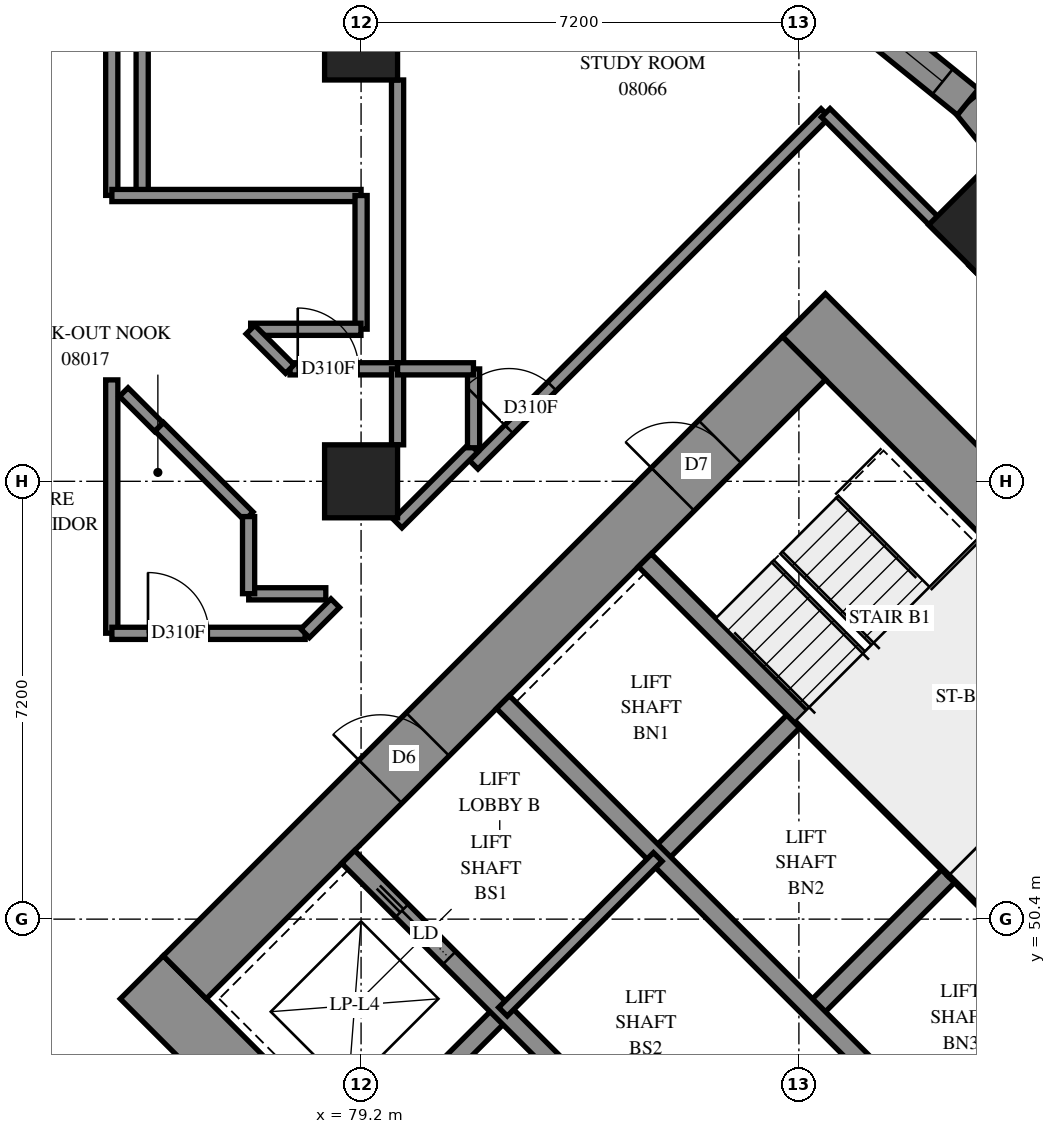
"""IFC4 building model, lengths in metres.
Left out: names, types, materials, properties, quantities, classifications, styles, units other than length and angle.
Written with IfcOpenShell. Run it as: python <this file> out.ifc"""

import sys

from ifc_helpers import new_model, si_unit, direction, frame, frame_2d, origin, origin_2d, place, context, subcontext, project, spatial, polyline, rectangle, outline, extrude, element, fill, save


model = new_model("IFC4")
c1 = context("Model", 3, precision=1e-05, world=origin(), true_north=direction((0.0, 1.0)))
c2 = subcontext(c1, "Body", "Model", "MODEL_VIEW")
j1 = project(units=[si_unit("LENGTHUNIT", "METRE"), si_unit("PLANEANGLEUNIT", "RADIAN")], contexts=[c1])
p1 = place(None, origin())
s1 = spatial("IfcSite", under=j1, at=p1, CompositionType="ELEMENT")
p2 = place(p1, origin())
s2 = spatial("IfcBuilding", under=s1, at=p2, CompositionType="ELEMENT")
p3 = place(p2, frame((0.0, 0.0, 33.8)))
s3 = spatial("IfcBuildingStorey", under=s2, at=p3, CompositionType="ELEMENT", Elevation=33.8)
for number, where, z_axis, x_axis in (
    (1, (79.2, 57.6, 0.0), (0.0, 0.0, 1.0), (1.0, 0.0, 0.0)),
    (2, (79.2, 64.8, 0.0), (0.0, 0.0, 1.0), (1.0, 0.0, 0.0)),
    (3, (89.382, 61.818, 0.0), (0.0, 0.0, 1.0), (0.707, -0.707, 0.0)),
):
    element("IfcColumn", number, at=place(p3, frame(where, z_axis=z_axis, x_axis=x_axis)), inside=s3, PredefinedType="COLUMN", context=c2, shape_type="SweptSolid", body=[
        extrude(rectangle(XDim=1.2, YDim=1.2, at=origin_2d()), origin(), (0.0, 0.0, 1.0), 3.1),
    ])
p4 = place(p3, frame((75.594, 49.443, -0.3), z_axis=(0.0, 0.0, 1.0), x_axis=(0.7071037324, -0.70710983, 0.0)))
e4 = element("IfcWall", 4, at=p4, inside=s3, PredefinedType="SHEAR", context=c2, shape_type="SweptSolid", body=[
    extrude(rectangle(XDim=16.4, YDim=1.0, at=frame_2d((8.2, 0.0))), origin(), (0.0, 0.0, 1.0), 2.7),
])
p5 = place(p3, frame((86.483, 60.333, -0.3), z_axis=(0.0, 0.0, 1.0), x_axis=(0.70710983, -0.7071037324, 0.0)))
e5 = element("IfcWall", 5, at=p5, inside=s3, PredefinedType="SHEAR", context=c2, shape_type="SweptSolid", body=[
    extrude(rectangle(XDim=16.4, YDim=1.0, at=frame_2d((8.2, 0.0))), origin(), (0.0, 0.0, 1.0), 2.7),
])
p6 = place(p5, frame((11.0, 0.0, 0.3)))
e6 = element("IfcOpeningElement", 6, at=p6, cuts=e5, PredefinedType="OPENING", context=c2, shape_type="SweptSolid", body=[
    extrude(rectangle(XDim=0.8, YDim=2.1, at=frame_2d((0.4, 1.05))), frame((0.0, 0.51, 0.0), z_axis=(0.0, -1.0, 0.0), x_axis=(1.0, 0.0, 0.0)), (0.0, 0.0, 1.0), 1.02),
])
p7 = place(p3, frame((76.301, 49.443, -0.3), z_axis=(0.0, 0.0, 1.0), x_axis=(0.7071067812, 0.7071067812, 0.0)))
e7 = element("IfcWall", 7, at=p7, inside=s3, PredefinedType="SHEAR", context=c2, shape_type="SweptSolid", body=[
    extrude(rectangle(XDim=14.4, YDim=1.0, at=frame_2d((7.2, 0.0))), origin(), (0.0, 0.0, 1.0), 2.7),
])
p8 = place(p7, frame((4.55, 0.0, 0.3)))
e8 = element("IfcOpeningElement", 8, at=p8, cuts=e7, PredefinedType="OPENING", context=c2, shape_type="SweptSolid", body=[
    extrude(rectangle(XDim=1.1, YDim=2.1, at=frame_2d((0.55, 1.05))), frame((0.0, 0.51, 0.0), z_axis=(0.0, -1.0, 0.0), x_axis=(1.0, 0.0, 0.0)), (0.0, 0.0, 1.0), 1.02),
])
p9 = place(p7, frame((11.35, 0.0, 0.3)))
e9 = element("IfcOpeningElement", 9, at=p9, cuts=e7, PredefinedType="OPENING", context=c2, shape_type="SweptSolid", body=[
    extrude(rectangle(XDim=1.1, YDim=2.1, at=frame_2d((0.55, 1.05))), frame((0.0, 0.51, 0.0), z_axis=(0.0, -1.0, 0.0), x_axis=(1.0, 0.0, 0.0)), (0.0, 0.0, 1.0), 1.02),
])
p10 = place(p3, frame((87.19, 38.554, -0.3), z_axis=(0.0, 0.0, 1.0), x_axis=(0.707103309, 0.7071102534, 0.0)))
e10 = element("IfcWall", 10, at=p10, inside=s3, PredefinedType="SHEAR", context=c2, shape_type="SweptSolid", body=[
    extrude(rectangle(XDim=14.4, YDim=1.0, at=frame_2d((7.2, 0.0))), origin(), (0.0, 0.0, 1.0), 2.7),
])
p11 = place(p10, frame((4.55, 0.0, 0.3)))
e11 = element("IfcOpeningElement", 11, at=p11, cuts=e10, PredefinedType="OPENING", context=c2, shape_type="SweptSolid", body=[
    extrude(rectangle(XDim=1.1, YDim=2.1, at=frame_2d((0.55, 1.05))), frame((0.0, 0.51, 0.0), z_axis=(0.0, -1.0, 0.0), x_axis=(1.0, 0.0, 0.0)), (0.0, 0.0, 1.0), 1.02),
])
p12 = place(p10, frame((11.35, 0.0, 0.3)))
e12 = element("IfcOpeningElement", 12, at=p12, cuts=e10, PredefinedType="OPENING", context=c2, shape_type="SweptSolid", body=[
    extrude(rectangle(XDim=1.1, YDim=2.1, at=frame_2d((0.55, 1.05))), frame((0.0, 0.51, 0.0), z_axis=(0.0, -1.0, 0.0), x_axis=(1.0, 0.0, 0.0)), (0.0, 0.0, 1.0), 1.02),
])
for number, where, z_axis, x_axis in (
    (13, (79.2, 46.544, 0.0), (0.0, 0.0, 1.0), (0.707, 0.707, 0.0)),
    (14, (84.079, 51.423, 0.0), (0.0, 0.0, 1.0), (0.707, 0.707, 0.0)),
):
    element("IfcWall", number, at=place(p3, frame(where, z_axis=z_axis, x_axis=x_axis)), inside=s3, PredefinedType="SOLIDWALL", context=c2, shape_type="SweptSolid", body=[
        extrude(rectangle(XDim=3.3, YDim=0.3, at=frame_2d((1.65, 0.0))), origin(), (0.0, 0.0, 1.0), 3.1),
    ])
for number, where, z_axis, x_axis in (
    (15, (86.625, 48.878, 0.0), (0.0, 0.0, 1.0), (0.707, 0.707, 0.0)),
    (16, (89.17, 46.332, 0.0), (0.0, 0.0, 1.0), (0.707, 0.707, 0.0)),
):
    element("IfcWall", number, at=place(p3, frame(where, z_axis=z_axis, x_axis=x_axis)), inside=s3, PredefinedType="SOLIDWALL", context=c2, shape_type="SweptSolid", body=[
        extrude(rectangle(XDim=3.3, YDim=0.3, at=frame_2d((1.65, 0.0))), origin(), (0.0, 0.0, 1.0), 3.1),
    ])
p13 = place(p3, frame((78.988, 51.423, 0.0), z_axis=(0.0, 0.0, 1.0), x_axis=(0.7071067812, -0.7071067812, 0.0)))
e17 = element("IfcWall", 17, at=p13, inside=s3, PredefinedType="SOLIDWALL", context=c2, shape_type="SweptSolid", body=[
    extrude(rectangle(XDim=14.4, YDim=0.3, at=frame_2d((7.2, 0.0))), origin(), (0.0, 0.0, 1.0), 3.1),
])
p14 = place(p13, frame((1.25, 0.0, 0.0)))
e18 = element("IfcOpeningElement", 18, at=p14, cuts=e17, PredefinedType="OPENING", context=c2, shape_type="SweptSolid", body=[
    extrude(rectangle(XDim=1.1, YDim=2.1, at=frame_2d((0.55, 1.05))), frame((0.0, 0.16, 0.0), z_axis=(0.0, -1.0, 0.0), x_axis=(1.0, 0.0, 0.0)), (0.0, 0.0, 1.0), 0.32),
])
p15 = place(p13, frame((4.85, 0.0, 0.0)))
e19 = element("IfcOpeningElement", 19, at=p15, cuts=e17, PredefinedType="OPENING", context=c2, shape_type="SweptSolid", body=[
    extrude(rectangle(XDim=1.1, YDim=2.1, at=frame_2d((0.55, 1.05))), frame((0.0, 0.16, 0.0), z_axis=(0.0, -1.0, 0.0), x_axis=(1.0, 0.0, 0.0)), (0.0, 0.0, 1.0), 0.32),
])
p16 = place(p13, frame((8.45, 0.0, 0.0)))
e20 = element("IfcOpeningElement", 20, at=p16, cuts=e17, PredefinedType="OPENING", context=c2, shape_type="SweptSolid", body=[
    extrude(rectangle(XDim=1.1, YDim=2.1, at=frame_2d((0.55, 1.05))), frame((0.0, 0.16, 0.0), z_axis=(0.0, -1.0, 0.0), x_axis=(1.0, 0.0, 0.0)), (0.0, 0.0, 1.0), 0.32),
])
p17 = place(p13, frame((12.05, 0.0, 0.0)))
e21 = element("IfcOpeningElement", 21, at=p17, cuts=e17, PredefinedType="OPENING", context=c2, shape_type="SweptSolid", body=[
    extrude(rectangle(XDim=1.1, YDim=2.1, at=frame_2d((0.55, 1.05))), frame((0.0, 0.16, 0.0), z_axis=(0.0, -1.0, 0.0), x_axis=(1.0, 0.0, 0.0)), (0.0, 0.0, 1.0), 0.32),
])
p18 = place(p3, frame((81.534, 53.969, 0.0), z_axis=(0.0, 0.0, 1.0), x_axis=(0.707103309, -0.7071102534, 0.0)))
e22 = element("IfcWall", 22, at=p18, inside=s3, PredefinedType="SOLIDWALL", context=c2, shape_type="SweptSolid", body=[
    extrude(rectangle(XDim=14.4, YDim=0.3, at=frame_2d((7.2, 0.0))), origin(), (0.0, 0.0, 1.0), 3.1),
])
p19 = place(p18, frame((12.05, 0.0, 0.0)))
e23 = element("IfcOpeningElement", 23, at=p19, cuts=e22, PredefinedType="OPENING", context=c2, shape_type="SweptSolid", body=[
    extrude(rectangle(XDim=1.1, YDim=2.1, at=frame_2d((0.55, 1.05))), frame((0.0, 0.16, 0.0), z_axis=(0.0, -1.0, 0.0), x_axis=(1.0, 0.0, 0.0)), (0.0, 0.0, 1.0), 0.32),
])
for number, where, z_axis, x_axis in (
    (24, (83.867, 56.302, 0.0), (0.0, 0.0, 1.0), (0.707, -0.707, 0.0)),
    (25, (88.958, 51.211, 0.0), (0.0, 0.0, 1.0), (0.707, -0.707, 0.0)),
):
    element("IfcWall", number, at=place(p3, frame(where, z_axis=z_axis, x_axis=x_axis)), inside=s3, PredefinedType="SOLIDWALL", context=c2, shape_type="SweptSolid", body=[
        extrude(rectangle(XDim=7.2, YDim=0.3, at=frame_2d((3.6, 0.0))), origin(), (0.0, 0.0, 1.0), 3.1),
    ])
p20 = place(p3, frame((88.958, 51.211, 0.0), z_axis=(0.0, 0.0, 1.0), x_axis=(0.7071067812, 0.7071067812, 0.0)))
e26 = element("IfcWall", 26, at=p20, inside=s3, PredefinedType="SOLIDWALL", context=c2, shape_type="SweptSolid", body=[
    extrude(rectangle(XDim=4.2, YDim=0.3, at=frame_2d((2.1, 0.0))), origin(), (0.0, 0.0, 1.0), 3.1),
])
p21 = place(p3, frame((91.35, 61.156, 0.0), z_axis=(0.0, 0.0, 1.0), x_axis=(-0.6292374191, 0.7772131435, 0.0)))
e27 = element("IfcWall", 27, at=p21, inside=s3, PredefinedType="SOLIDWALL", context=c2, shape_type="SweptSolid", body=[
    extrude(outline(polyline([(0.029, -0.275), (3.479, -0.275), (3.421, 0.275), (-0.029, 0.275), (0.029, -0.275)])), origin(), (0.0, 0.0, 1.0), 3.1),
])
p22 = place(p21, frame((0.435, 0.0, 0.5)))
e28 = element("IfcOpeningElement", 28, at=p22, cuts=e27, PredefinedType="OPENING", context=c2, shape_type="SweptSolid", body=[
    extrude(rectangle(XDim=1.2, YDim=2.45, at=frame_2d((0.6, 1.225))), frame((0.0, 0.285, 0.0), z_axis=(0.0, -1.0, 0.0), x_axis=(1.0, 0.0, 0.0)), (0.0, 0.0, 1.0), 0.57),
])
p23 = place(p3, frame((89.18, 63.837, 0.0), z_axis=(0.0, 0.0, 1.0), x_axis=(-0.7772131435, 0.6292374191, 0.0)))
e29 = element("IfcWall", 29, at=p23, inside=s3, PredefinedType="SOLIDWALL", context=c2, shape_type="SweptSolid", body=[
    extrude(outline(polyline([(-0.029, -0.275), (3.421, -0.275), (3.479, 0.275), (0.029, 0.275), (-0.029, -0.275)])), origin(), (0.0, 0.0, 1.0), 3.1),
])
p24 = place(p23, frame((0.534, 0.0, 0.5)))
e30 = element("IfcOpeningElement", 30, at=p24, cuts=e29, PredefinedType="OPENING", context=c2, shape_type="SweptSolid", body=[
    extrude(rectangle(XDim=1.2, YDim=2.45, at=frame_2d((0.6, 1.225))), frame((0.0, 0.285, 0.0), z_axis=(0.0, -1.0, 0.0), x_axis=(1.0, 0.0, 0.0)), (0.0, 0.0, 1.0), 0.57),
])
p25 = place(p3, frame((81.534, 48.878, 0.0), z_axis=(0.0, 0.0, 1.0), x_axis=(0.707092892, 0.7071206701, 0.0)))
e31 = element("IfcWall", 31, at=p25, inside=s3, PredefinedType="PARTITIONING", context=c2, shape_type="SweptSolid", body=[
    extrude(rectangle(XDim=3.6, YDim=0.2, at=frame_2d((1.8, 0.0))), origin(), (0.0, 0.0, 1.0), 3.1),
])
p26 = place(p3, frame((75.6, 62.3, 0.0), z_axis=(0.0, 0.0, 1.0), x_axis=(0.0, 1.0, 0.0)))
e32 = element("IfcWall", 32, at=p26, inside=s3, PredefinedType="PARTITIONING", context=c2, shape_type="SweptSolid", body=[
    extrude(rectangle(XDim=10.415, YDim=0.2, at=frame_2d((5.207, 0.0))), origin(), (0.0, 0.0, 1.0), 3.1),
])
p27 = place(p3, frame((81.052, 57.873, 0.0), z_axis=(0.0, 0.0, 1.0), x_axis=(0.7071067812, 0.7071067812, 0.0)))
e33 = element("IfcWall", 33, at=p27, inside=s3, PredefinedType="PARTITIONING", context=c2, shape_type="SweptSolid", body=[
    extrude(rectangle(XDim=8.18, YDim=0.2, at=frame_2d((4.09, 0.0))), origin(), (0.0, 0.0, 1.0), 3.1),
])
p28 = place(p27, frame((0.823, 0.0, 0.0)))
e34 = element("IfcOpeningElement", 34, at=p28, cuts=e33, PredefinedType="OPENING", context=c2, shape_type="SweptSolid", body=[
    extrude(rectangle(XDim=1.0, YDim=2.1, at=frame_2d((0.5, 1.05))), frame((0.0, 0.11, 0.0), z_axis=(0.0, -1.0, 0.0), x_axis=(1.0, 0.0, 0.0)), (0.0, 0.0, 1.0), 0.22),
])
p29 = place(p3, frame((89.271, 61.215, 0.0), z_axis=(0.0, 0.0, 1.0), x_axis=(0.7071067812, -0.7071067812, 0.0)))
e35 = element("IfcWall", 35, at=p29, inside=s3, PredefinedType="PARTITIONING", context=c2, shape_type="SweptSolid", body=[
    extrude(rectangle(XDim=6.505, YDim=0.2, at=frame_2d((3.253, 0.0))), origin(), (0.0, 0.0, 1.0), 3.1),
])
p30 = place(p3, frame((75.1, 62.302, 0.0), z_axis=(0.0, 0.0, 1.0), x_axis=(0.0, 1.0, 0.0)))
e36 = element("IfcWall", 36, at=p30, inside=s3, PredefinedType="PARTITIONING", context=c2, shape_type="SweptSolid", body=[
    extrude(rectangle(XDim=5.598, YDim=0.2, at=frame_2d((2.799, 0.0))), origin(), (0.0, 0.0, 1.0), 3.1),
])
p31 = place(p3, frame((79.8, 59.45, 0.0), z_axis=(0.0, 0.0, 1.0), x_axis=(0.0, 1.0, 0.0)))
e37 = element("IfcWall", 37, at=p31, inside=s3, PredefinedType="PARTITIONING", context=c2, shape_type="SweptSolid", body=[
    extrude(rectangle(XDim=4.75, YDim=0.2, at=frame_2d((2.375, 0.0))), origin(), (0.0, 0.0, 1.0), 3.1),
])
p32 = place(p3, frame((75.1, 55.102, 0.0), z_axis=(0.0, 0.0, 1.0), x_axis=(0.0, 1.0, 0.0)))
e38 = element("IfcWall", 38, at=p32, inside=s3, PredefinedType="PARTITIONING", context=c2, shape_type="SweptSolid", body=[
    extrude(rectangle(XDim=4.166, YDim=0.2, at=frame_2d((2.083, 0.0))), origin(), (0.0, 0.0, 1.0), 3.1),
])
p33 = place(p3, frame((75.102, 62.3, 0.0), z_axis=(0.0, 0.0, 1.0), x_axis=(1.0, 0.0, 0.0)))
e39 = element("IfcWall", 39, at=p33, inside=s3, PredefinedType="PARTITIONING", context=c2, shape_type="SweptSolid", body=[
    extrude(rectangle(XDim=4.098, YDim=0.2, at=frame_2d((2.049, 0.0))), origin(), (0.0, 0.0, 1.0), 3.1),
])
p34 = place(p3, frame((75.102, 55.1, 0.0), z_axis=(0.0, 0.0, 1.0), x_axis=(1.0, 0.0, 0.0)))
e40 = element("IfcWall", 40, at=p34, inside=s3, PredefinedType="PARTITIONING", context=c2, shape_type="SweptSolid", body=[
    extrude(rectangle(XDim=3.178, YDim=0.2, at=frame_2d((1.589, 0.0))), origin(), (0.0, 0.0, 1.0), 3.1),
])
p35 = place(p34, frame((0.594, 0.0, 0.0)))
e41 = element("IfcOpeningElement", 41, at=p35, cuts=e40, PredefinedType="OPENING", context=c2, shape_type="SweptSolid", body=[
    extrude(rectangle(XDim=1.0, YDim=2.1, at=frame_2d((0.5, 1.05))), frame((0.0, 0.11, 0.0), z_axis=(0.0, -1.0, 0.0), x_axis=(1.0, 0.0, 0.0)), (0.0, 0.0, 1.0), 0.22),
])
p36 = place(p3, frame((86.841, 63.659, 0.0), z_axis=(0.0, 0.0, 1.0), x_axis=(0.7067795096, -0.7074339014, 0.0)))
e42 = element("IfcWall", 42, at=p36, inside=s3, PredefinedType="PARTITIONING", context=c2, shape_type="SweptSolid", body=[
    extrude(rectangle(XDim=2.751, YDim=0.2, at=frame_2d((1.375, 0.0))), origin(), (0.0, 0.0, 1.0), 3.1),
])
p37 = place(p3, frame((79.2, 60.102, 0.0), z_axis=(0.0, 0.0, 1.0), x_axis=(0.0, 1.0, 0.0)))
e43 = element("IfcWall", 43, at=p37, inside=s3, PredefinedType="PARTITIONING", context=c2, shape_type="SweptSolid", body=[
    extrude(rectangle(XDim=2.198, YDim=0.2, at=frame_2d((1.099, 0.0))), origin(), (0.0, 0.0, 1.0), 3.1),
])
p38 = place(p3, frame((75.879, 58.497, 0.0), z_axis=(0.0, 0.0, 1.0), x_axis=(0.7075866635, -0.706626573, 0.0)))
e44 = element("IfcWall", 44, at=p38, inside=s3, PredefinedType="PARTITIONING", context=c2, shape_type="SweptSolid", body=[
    extrude(rectangle(XDim=2.083, YDim=0.2, at=frame_2d((1.042, 0.0))), origin(), (0.0, 0.0, 1.0), 3.1),
])
p39 = place(p3, frame((77.384, 60.1, 0.0), z_axis=(0.0, 0.0, 1.0), x_axis=(1.0, 0.0, 0.0)))
e45 = element("IfcWall", 45, at=p39, inside=s3, PredefinedType="PARTITIONING", context=c2, shape_type="SweptSolid", body=[
    extrude(rectangle(XDim=1.814, YDim=0.2, at=frame_2d((0.907, 0.0))), origin(), (0.0, 0.0, 1.0), 3.1),
])
p40 = place(p3, frame((78.032, 59.45, 0.0), z_axis=(0.0, 0.0, 1.0), x_axis=(1.0, 0.0, 0.0)))
e46 = element("IfcWall", 46, at=p40, inside=s3, PredefinedType="PARTITIONING", context=c2, shape_type="SweptSolid", body=[
    extrude(rectangle(XDim=1.768, YDim=0.2, at=frame_2d((0.884, 0.0))), origin(), (0.0, 0.0, 1.0), 3.1),
])
p41 = place(p40, frame((0.126, 0.0, 0.0)))
e47 = element("IfcOpeningElement", 47, at=p41, cuts=e46, PredefinedType="OPENING", context=c2, shape_type="SweptSolid", body=[
    extrude(rectangle(XDim=1.0, YDim=2.1, at=frame_2d((0.5, 1.05))), frame((0.0, 0.11, 0.0), z_axis=(0.0, -1.0, 0.0), x_axis=(1.0, 0.0, 0.0)), (0.0, 0.0, 1.0), 0.22),
])
p42 = place(p3, frame((79.801, 56.905, 0.0), z_axis=(0.0, 0.0, 1.0), x_axis=(0.7071067812, 0.7071067812, 0.0)))
e48 = element("IfcWall", 48, at=p42, inside=s3, PredefinedType="PARTITIONING", context=c2, shape_type="SweptSolid", body=[
    extrude(rectangle(XDim=1.765, YDim=0.2, at=frame_2d((0.882, 0.0))), origin(), (0.0, 0.0, 1.0), 3.1),
])
p43 = place(p3, frame((81.05, 58.152, 0.0), z_axis=(0.0, 0.0, 1.0), x_axis=(0.0, 1.0, 0.0)))
e49 = element("IfcWall", 49, at=p43, inside=s3, PredefinedType="PARTITIONING", context=c2, shape_type="SweptSolid", body=[
    extrude(rectangle(XDim=1.296, YDim=0.2, at=frame_2d((0.648, 0.0))), origin(), (0.0, 0.0, 1.0), 3.1),
])
for number, where, z_axis, x_axis in (
    (50, (77.352, 55.75, 0.0), (0.0, 0.0, 1.0), (1.0, 0.0, 0.0)),
    (51, (77.35, 55.752, 0.0), (0.0, 0.0, 1.0), (0.0, 1.0, 0.0)),
):
    element("IfcWall", number, at=place(p3, frame(where, z_axis=z_axis, x_axis=x_axis)), inside=s3, PredefinedType="PARTITIONING", context=c2, shape_type="SweptSolid", body=[
        extrude(rectangle(XDim=1.268, YDim=0.2, at=frame_2d((0.634, 0.0))), origin(), (0.0, 0.0, 1.0), 3.1),
    ])
p44 = place(p3, frame((79.8, 58.2, 0.0), z_axis=(0.0, 0.0, 1.0), x_axis=(0.0, 1.0, 0.0)))
e52 = element("IfcWall", 52, at=p44, inside=s3, PredefinedType="PARTITIONING", context=c2, shape_type="SweptSolid", body=[
    extrude(rectangle(XDim=1.25, YDim=0.2, at=frame_2d((0.625, 0.0))), origin(), (0.0, 0.0, 1.0), 3.1),
])
p45 = place(p3, frame((79.8, 59.45, 0.0), z_axis=(0.0, 0.0, 1.0), x_axis=(1.0, 0.0, 0.0)))
e53 = element("IfcWall", 53, at=p45, inside=s3, PredefinedType="PARTITIONING", context=c2, shape_type="SweptSolid", body=[
    extrude(rectangle(XDim=1.248, YDim=0.2, at=frame_2d((0.624, 0.0))), origin(), (0.0, 0.0, 1.0), 3.1),
])
p46 = place(p3, frame((77.381, 60.095, 0.0), z_axis=(0.0, 0.0, 1.0), x_axis=(0.7071067812, -0.7071067812, 0.0)))
e54 = element("IfcWall", 54, at=p46, inside=s3, PredefinedType="PARTITIONING", context=c2, shape_type="SweptSolid", body=[
    extrude(rectangle(XDim=0.916, YDim=0.2, at=frame_2d((0.458, 0.0))), origin(), (0.0, 0.0, 1.0), 3.1),
])
p47 = place(p3, frame((75.297, 59.067, 0.0), z_axis=(0.0, 0.0, 1.0), x_axis=(0.7071067812, -0.7071067812, 0.0)))
e55 = element("IfcWall", 55, at=p47, inside=s3, PredefinedType="PARTITIONING", context=c2, shape_type="SweptSolid", body=[
    extrude(rectangle(XDim=0.815, YDim=0.2, at=frame_2d((0.407, 0.0))), origin(), (0.0, 0.0, 1.0), 3.1),
])
p48 = place(p3, frame((78.279, 55.1, 0.0), z_axis=(0.0, 0.0, 1.0), x_axis=(0.7071067812, 0.7071067812, 0.0)))
e56 = element("IfcWall", 56, at=p48, inside=s3, PredefinedType="PARTITIONING", context=c2, shape_type="SweptSolid", body=[
    extrude(rectangle(XDim=0.701, YDim=0.2, at=frame_2d((0.351, 0.0))), origin(), (0.0, 0.0, 1.0), 3.1),
])
p49 = place(p24, origin())
e57 = element("IfcWindow", 57, at=p49, inside=s3, PartitioningType="SINGLE_PANEL", PredefinedType="WINDOW", context=c2, shape_type="SweptSolid", body=[
    extrude(rectangle(XDim=1.2, YDim=2.45, at=frame_2d((0.6, 1.225))), frame((0.0, 0.155, 0.0), z_axis=(0.0, -1.0, 0.0), x_axis=(1.0, 0.0, 0.0)), (0.0, 0.0, 1.0), 0.06),
])
fill(e30, e57)
p50 = place(p8, origin())
e58 = element("IfcDoor", 58, at=p50, inside=s3, OperationType="DOUBLE_DOOR_SINGLE_SWING", PredefinedType="DOOR", context=c2, shape_type="SweptSolid", body=[
    extrude(rectangle(XDim=1.1, YDim=2.1, at=frame_2d((0.55, 1.05))), frame((0.0, 0.025, 0.0), z_axis=(0.0, -1.0, 0.0), x_axis=(1.0, 0.0, 0.0)), (0.0, 0.0, 1.0), 0.05),
])
fill(e8, e58)
p51 = place(p9, origin())
e59 = element("IfcDoor", 59, at=p51, inside=s3, OperationType="SINGLE_SWING_LEFT", PredefinedType="DOOR", context=c2, shape_type="SweptSolid", body=[
    extrude(rectangle(XDim=1.1, YDim=2.1, at=frame_2d((0.55, 1.05))), frame((0.0, 0.025, 0.0), z_axis=(0.0, -1.0, 0.0), x_axis=(1.0, 0.0, 0.0)), (0.0, 0.0, 1.0), 0.05),
])
fill(e9, e59)
p52 = place(p14, origin())
e60 = element("IfcDoor", 60, at=p52, inside=s3, OperationType="SLIDING_TO_LEFT", PredefinedType="DOOR", context=c2, shape_type="SweptSolid", body=[
    extrude(rectangle(XDim=1.1, YDim=2.1, at=frame_2d((0.55, 1.05))), frame((0.0, 0.025, 0.0), z_axis=(0.0, -1.0, 0.0), x_axis=(1.0, 0.0, 0.0)), (0.0, 0.0, 1.0), 0.05),
])
fill(e18, e60)
p53 = place(p35, origin())
e61 = element("IfcDoor", 61, at=p53, inside=s3, OperationType="SINGLE_SWING_LEFT", PredefinedType="DOOR", context=c2, shape_type="SweptSolid", body=[
    extrude(rectangle(XDim=1.0, YDim=2.1, at=frame_2d((0.5, 1.05))), frame((0.0, 0.025, 0.0), z_axis=(0.0, -1.0, 0.0), x_axis=(1.0, 0.0, 0.0)), (0.0, 0.0, 1.0), 0.05),
])
fill(e41, e61)
p54 = place(p41, origin())
e62 = element("IfcDoor", 62, at=p54, inside=s3, OperationType="SINGLE_SWING_LEFT", PredefinedType="DOOR", context=c2, shape_type="SweptSolid", body=[
    extrude(rectangle(XDim=1.0, YDim=2.1, at=frame_2d((0.5, 1.05))), frame((0.0, 0.025, 0.0), z_axis=(0.0, -1.0, 0.0), x_axis=(1.0, 0.0, 0.0)), (0.0, 0.0, 1.0), 0.05),
])
fill(e47, e62)
p55 = place(p28, origin())
e63 = element("IfcDoor", 63, at=p55, inside=s3, OperationType="SINGLE_SWING_RIGHT", PredefinedType="DOOR", context=c2, shape_type="SweptSolid", body=[
    extrude(rectangle(XDim=1.0, YDim=2.1, at=frame_2d((0.5, 1.05))), frame((0.0, 0.025, 0.0), z_axis=(0.0, -1.0, 0.0), x_axis=(1.0, 0.0, 0.0)), (0.0, 0.0, 1.0), 0.05),
])
fill(e34, e63)
save(model, sys.argv[1])
